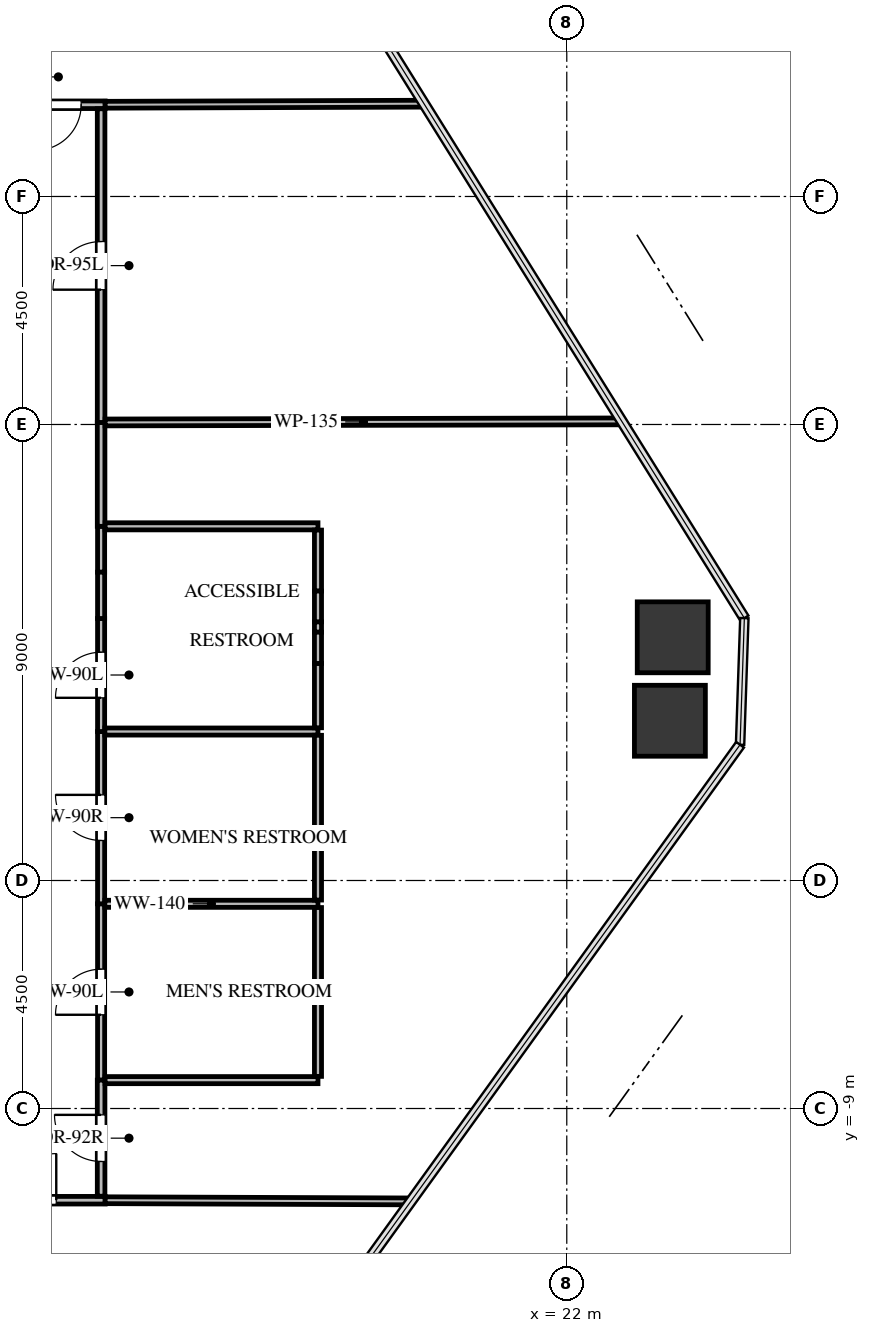
"""IFC4 building model, lengths in metres.
Left out: names, types, materials, properties, quantities, classifications, styles, units other than length and angle.
Written with IfcOpenShell. Run it as: python <this file> out.ifc"""

import sys

from ifc_helpers import new_model, si_unit, direction, frame, frame_2d, origin, origin_2d, place, context, subcontext, project, spatial, rectangle, extrude, source, transform, mapped, element, fill, save


model = new_model("IFC4")
c1 = context("Model", 3, precision=1e-05, world=origin(), true_north=direction((0.0, 1.0)))
c2 = subcontext(c1, "Body", "Model", "MODEL_VIEW")
j1 = project(units=[si_unit("LENGTHUNIT", "METRE"), si_unit("PLANEANGLEUNIT", "RADIAN")], contexts=[c1])
p1 = place(None, origin())
s1 = spatial("IfcSite", under=j1, at=p1, CompositionType="ELEMENT")
p2 = place(p1, origin())
s2 = spatial("IfcBuilding", under=s1, at=p2, CompositionType="ELEMENT")
p3 = place(p2, frame((0.0, 0.0, 45.6)))
s3 = spatial("IfcBuildingStorey", under=s2, at=p3, CompositionType="ELEMENT", Elevation=45.6)
m1 = source(origin(), c2, "Body", "SweptSolid", [
    extrude(rectangle(XDim=1.4, YDim=1.4, at=origin_2d()), origin(), (0.0, 0.0, 1.0), 3.3),
])
for number, where, z_axis, x_axis in (
    (1, (24.091, 0.3, -0.24), (0.0, 0.0, 1.0), (1.0, 0.0, 0.0)),
    (2, (24.035, -1.347, -0.24), (0.0, 0.0, 1.0), (1.0, 0.0, 0.0)),
):
    element("IfcColumn", number, at=place(p3, frame(where, z_axis=z_axis, x_axis=x_axis)), inside=s3, PredefinedType="COLUMN", context=c2, shape_type="MappedRepresentation", body=[
        mapped(m1, transform((0.0, 0.0, 0.0), x_axis=(1.0, 0.0, 0.0), y_axis=(0.0, 1.0, 0.0), z_axis=(0.0, 0.0, 1.0), scale=1.0)),
    ])
p4 = place(p3, frame((12.81, -8.44, 0.0), z_axis=(0.0, 0.0, 1.0), x_axis=(0.0, 1.0, 0.0)))
e3 = element("IfcWall", 3, at=p4, inside=s3, PredefinedType="PARTITIONING", context=c2, shape_type="SweptSolid", body=[
    extrude(rectangle(XDim=3.48, YDim=0.14, at=frame_2d((1.74, 0.0))), origin(), (0.0, 0.0, 1.0), 3.045),
])
p5 = place(p4, frame((1.29, 0.0, 0.0)))
e4 = element("IfcOpeningElement", 4, at=p5, cuts=e3, PredefinedType="OPENING", context=c2, shape_type="SweptSolid", body=[
    extrude(rectangle(XDim=0.9, YDim=2.05, at=frame_2d((0.45, 1.025))), frame((0.0, 0.08, 0.0), z_axis=(0.0, -1.0, 0.0), x_axis=(1.0, 0.0, 0.0)), (0.0, 0.0, 1.0), 0.16),
])
p6 = place(p3, frame((12.81, -4.96, 0.0), z_axis=(0.0, 0.0, 1.0), x_axis=(0.0, 1.0, 0.0)))
e5 = element("IfcWall", 5, at=p6, inside=s3, PredefinedType="PARTITIONING", context=c2, shape_type="SweptSolid", body=[
    extrude(rectangle(XDim=3.4, YDim=0.14, at=frame_2d((1.7, 0.0))), origin(), (0.0, 0.0, 1.0), 3.045),
])
p7 = place(p6, frame((1.25, 0.0, 0.0)))
e6 = element("IfcOpeningElement", 6, at=p7, cuts=e5, PredefinedType="OPENING", context=c2, shape_type="SweptSolid", body=[
    extrude(rectangle(XDim=0.9, YDim=2.05, at=frame_2d((0.45, 1.025))), frame((0.0, 0.08, 0.0), z_axis=(0.0, -1.0, 0.0), x_axis=(1.0, 0.0, 0.0)), (0.0, 0.0, 1.0), 0.16),
])
p8 = place(p3, frame((12.81, -1.56, 0.0), z_axis=(0.0, 0.0, 1.0), x_axis=(0.0, 1.0, 0.0)))
e7 = element("IfcWall", 7, at=p8, inside=s3, PredefinedType="PARTITIONING", context=c2, shape_type="SweptSolid", body=[
    extrude(rectangle(XDim=2.231, YDim=0.14, at=frame_2d((1.116, 0.0))), origin(), (0.0, 0.0, 1.0), 3.045),
])
p9 = place(p8, frame((0.666, 0.0, 0.0)))
e8 = element("IfcOpeningElement", 8, at=p9, cuts=e7, PredefinedType="OPENING", context=c2, shape_type="SweptSolid", body=[
    extrude(rectangle(XDim=0.9, YDim=2.05, at=frame_2d((0.45, 1.025))), frame((0.0, 0.08, 0.0), z_axis=(0.0, -1.0, 0.0), x_axis=(1.0, 0.0, 0.0)), (0.0, 0.0, 1.0), 0.16),
])
p10 = place(p3, frame((12.81, 1.585, 0.0), z_axis=(0.0, 0.0, 1.0), x_axis=(0.0, 1.0, 0.0)))
e9 = element("IfcWall", 9, at=p10, inside=s3, PredefinedType="PARTITIONING", context=c2, shape_type="SweptSolid", body=[
    extrude(rectangle(XDim=0.905, YDim=0.14, at=frame_2d((0.453, 0.0))), origin(), (0.0, 0.0, 1.0), 3.045),
])
p11 = place(p3, frame((12.81, 0.671, 0.0), z_axis=(0.0, 0.0, 1.0), x_axis=(0.0, 1.0, 0.0)))
e10 = element("IfcWall", 10, at=p11, inside=s3, PredefinedType="PARTITIONING", context=c2, shape_type="SweptSolid", body=[
    extrude(rectangle(XDim=0.914, YDim=0.14, at=frame_2d((0.457, 0.0))), origin(), (0.0, 0.0, 1.0), 2.13),
])
p12 = place(p3, frame((12.89, 10.81, 0.0), z_axis=(0.0, 0.0, 1.0), x_axis=(-1.0, 0.0, 0.0)))
e11 = element("IfcWall", 11, at=p12, inside=s3, PredefinedType="PARTITIONING", context=c2, shape_type="SweptSolid", body=[
    extrude(rectangle(XDim=1.847, YDim=0.15, at=frame_2d((0.924, 0.0))), origin(), (0.0, 0.0, 1.0), 3.045),
])
p13 = place(p12, frame((0.474, 0.0, 0.0)))
e12 = element("IfcOpeningElement", 12, at=p13, cuts=e11, PredefinedType="OPENING", context=c2, shape_type="SweptSolid", body=[
    extrude(rectangle(XDim=0.9, YDim=2.05, at=frame_2d((0.45, 1.025))), frame((0.0, 0.085, 0.0), z_axis=(0.0, -1.0, 0.0), x_axis=(1.0, 0.0, 0.0)), (0.0, 0.0, 1.0), 0.17),
])
p14 = place(p3, frame((10.04, -10.81, 0.0), z_axis=(0.0, 0.0, 1.0), x_axis=(1.0, 0.0, 0.0)))
e13 = element("IfcWall", 13, at=p14, inside=s3, PredefinedType="PARTITIONING", context=c2, shape_type="SweptSolid", body=[
    extrude(rectangle(XDim=2.85, YDim=0.15, at=frame_2d((1.425, 0.0))), origin(), (0.0, 0.0, 1.0), 3.045),
])
p15 = place(p14, frame((0.965, 0.0, 0.0)))
e14 = element("IfcOpeningElement", 14, at=p15, cuts=e13, PredefinedType="OPENING", context=c2, shape_type="SweptSolid", body=[
    extrude(rectangle(XDim=0.92, YDim=2.1, at=frame_2d((0.46, 1.05))), frame((0.0, 0.085, 0.0), z_axis=(0.0, -1.0, 0.0), x_axis=(1.0, 0.0, 0.0)), (0.0, 0.0, 1.0), 0.17),
])
p16 = place(p3, frame((12.81, -10.731, 0.0), z_axis=(0.0, 0.0, 1.0), x_axis=(0.0, 1.0, 0.0)))
e15 = element("IfcWall", 15, at=p16, inside=s3, PredefinedType="PARTITIONING", context=c2, shape_type="SweptSolid", body=[
    extrude(rectangle(XDim=2.291, YDim=0.15, at=frame_2d((1.146, 0.0))), origin(), (0.0, 0.0, 1.0), 3.045),
])
p17 = place(p16, frame((0.686, 0.0, 0.0)))
e16 = element("IfcOpeningElement", 16, at=p17, cuts=e15, PredefinedType="OPENING", context=c2, shape_type="SweptSolid", body=[
    extrude(rectangle(XDim=0.92, YDim=2.1, at=frame_2d((0.46, 1.05))), frame((0.0, 0.085, 0.0), z_axis=(0.0, -1.0, 0.0), x_axis=(1.0, 0.0, 0.0)), (0.0, 0.0, 1.0), 0.17),
])
p18 = place(p3, frame((12.81, 2.49, 0.0), z_axis=(0.0, 0.0, 1.0), x_axis=(0.0, 1.0, 0.0)))
e17 = element("IfcWall", 17, at=p18, inside=s3, PredefinedType="PARTITIONING", context=c2, shape_type="SweptSolid", body=[
    extrude(rectangle(XDim=2.05, YDim=0.15, at=frame_2d((1.025, 0.0))), origin(), (0.0, 0.0, 1.0), 3.045),
])
p19 = place(p3, frame((12.81, 4.54, 0.0), z_axis=(0.0, 0.0, 1.0), x_axis=(0.0, 1.0, 0.0)))
e18 = element("IfcWall", 18, at=p19, inside=s3, PredefinedType="PARTITIONING", context=c2, shape_type="SweptSolid", body=[
    extrude(rectangle(XDim=6.191, YDim=0.15, at=frame_2d((3.095, 0.0))), origin(), (0.0, 0.0, 1.0), 3.045),
])
p20 = place(p19, frame((2.621, 0.0, 0.0)))
e19 = element("IfcOpeningElement", 19, at=p20, cuts=e18, PredefinedType="OPENING", context=c2, shape_type="SweptSolid", body=[
    extrude(rectangle(XDim=0.95, YDim=2.1, at=frame_2d((0.475, 1.05))), frame((0.0, 0.085, 0.0), z_axis=(0.0, -1.0, 0.0), x_axis=(1.0, 0.0, 0.0)), (0.0, 0.0, 1.0), 0.17),
])
p21 = place(p3, frame((12.884, -4.96, 0.0), z_axis=(0.0, 0.0, 1.0), x_axis=(1.0, 0.0, 0.0)))
e20 = element("IfcWall", 20, at=p21, inside=s3, PredefinedType="PARTITIONING", context=c2, shape_type="SweptSolid", body=[
    extrude(rectangle(XDim=4.206, YDim=0.14, at=frame_2d((2.103, 0.0))), origin(), (0.0, 0.0, 1.0), 3.045),
])
p22 = place(p3, frame((17.09, -8.44, 0.0), z_axis=(0.0, 0.0, 1.0), x_axis=(-1.0, 0.0, 0.0)))
e21 = element("IfcWall", 21, at=p22, inside=s3, PredefinedType="PARTITIONING", context=c2, shape_type="SweptSolid", body=[
    extrude(rectangle(XDim=4.201, YDim=0.14, at=frame_2d((2.101, 0.0))), origin(), (0.0, 0.0, 1.0), 3.045),
])
p23 = place(p3, frame((17.09, -5.034, 0.0), z_axis=(0.0, 0.0, 1.0), x_axis=(0.0, -1.0, 0.0)))
e22 = element("IfcWall", 22, at=p23, inside=s3, PredefinedType="PARTITIONING", context=c2, shape_type="SweptSolid", body=[
    extrude(rectangle(XDim=3.332, YDim=0.14, at=frame_2d((1.666, 0.0))), origin(), (0.0, 0.0, 1.0), 3.045),
])
p24 = place(p3, frame((12.884, -1.56, 0.0), z_axis=(0.0, 0.0, 1.0), x_axis=(1.0, 0.0, 0.0)))
e23 = element("IfcWall", 23, at=p24, inside=s3, PredefinedType="PARTITIONING", context=c2, shape_type="SweptSolid", body=[
    extrude(rectangle(XDim=4.206, YDim=0.14, at=frame_2d((2.103, 0.0))), origin(), (0.0, 0.0, 1.0), 3.045),
])
p25 = place(p3, frame((17.09, -1.634, 0.0), z_axis=(0.0, 0.0, 1.0), x_axis=(0.0, -1.0, 0.0)))
e24 = element("IfcWall", 24, at=p25, inside=s3, PredefinedType="PARTITIONING", context=c2, shape_type="SweptSolid", body=[
    extrude(rectangle(XDim=3.252, YDim=0.14, at=frame_2d((1.626, 0.0))), origin(), (0.0, 0.0, 1.0), 3.045),
])
p26 = place(p3, frame((12.889, 2.49, 0.0), z_axis=(0.0, 0.0, 1.0), x_axis=(1.0, 0.0, 0.0)))
e25 = element("IfcWall", 25, at=p26, inside=s3, PredefinedType="PARTITIONING", context=c2, shape_type="SweptSolid", body=[
    extrude(rectangle(XDim=4.201, YDim=0.14, at=frame_2d((2.101, 0.0))), origin(), (0.0, 0.0, 1.0), 3.045),
])
p27 = place(p3, frame((17.09, 2.416, 0.0), z_axis=(0.0, 0.0, 1.0), x_axis=(0.0, -1.0, 0.0)))
e26 = element("IfcWall", 26, at=p27, inside=s3, PredefinedType="PARTITIONING", context=c2, shape_type="SweptSolid", body=[
    extrude(rectangle(XDim=1.204, YDim=0.14, at=frame_2d((0.602, 0.0))), origin(), (0.0, 0.0, 1.0), 3.045),
])
p28 = place(p3, frame((17.09, 0.606, 0.0), z_axis=(0.0, 0.0, 1.0), x_axis=(0.0, -1.0, 0.0)))
e27 = element("IfcWall", 27, at=p28, inside=s3, PredefinedType="PARTITIONING", context=c2, shape_type="SweptSolid", body=[
    extrude(rectangle(XDim=0.205, YDim=0.14, at=frame_2d((0.103, 0.0))), origin(), (0.0, 0.0, 1.0), 3.045),
])
p29 = place(p3, frame((17.09, -0.216, 0.0), z_axis=(0.0, 0.0, 1.0), x_axis=(0.0, -1.0, 0.0)))
e28 = element("IfcWall", 28, at=p29, inside=s3, PredefinedType="PARTITIONING", context=c2, shape_type="SweptSolid", body=[
    extrude(rectangle(XDim=1.27, YDim=0.14, at=frame_2d((0.635, 0.0))), origin(), (0.0, 0.0, 1.0), 3.045),
])
p30 = place(p3, frame((17.09, 1.212, 0.0), z_axis=(0.0, 0.0, 1.0), x_axis=(0.0, -1.0, 0.0)))
e29 = element("IfcWall", 29, at=p30, inside=s3, PredefinedType="PARTITIONING", context=c2, shape_type="SweptSolid", body=[
    extrude(rectangle(XDim=0.606, YDim=0.14, at=frame_2d((0.303, 0.0))), origin(), (0.0, 0.0, 1.0), 2.13),
])
p31 = place(p3, frame((17.09, 0.401, 0.0), z_axis=(0.0, 0.0, 1.0), x_axis=(0.0, -1.0, 0.0)))
e30 = element("IfcWall", 30, at=p31, inside=s3, PredefinedType="PARTITIONING", context=c2, shape_type="SweptSolid", body=[
    extrude(rectangle(XDim=0.617, YDim=0.14, at=frame_2d((0.309, 0.0))), origin(), (0.0, 0.0, 1.0), 2.13),
])
p32 = place(p3, frame((19.182, 10.831, 0.0), z_axis=(0.0, 0.0, 1.0), x_axis=(-0.999994432845, -0.003336806783, 0.0)))
e31 = element("IfcWall", 31, at=p32, inside=s3, PredefinedType="PARTITIONING", context=c2, shape_type="SweptSolid", body=[
    extrude(rectangle(XDim=6.292, YDim=0.135, at=frame_2d((3.146, 0.0))), origin(), (0.0, 0.0, 1.0), 2.38),
])
p33 = place(p3, frame((12.89, -10.81, 0.0), z_axis=(0.0, 0.0, 1.0), x_axis=(0.999992607823, -0.003845035728, 0.0)))
e32 = element("IfcWall", 32, at=p33, inside=s3, PredefinedType="PARTITIONING", context=c2, shape_type="SweptSolid", body=[
    extrude(rectangle(XDim=6.032, YDim=0.135, at=frame_2d((3.016, 0.0))), origin(), (0.0, 0.0, 1.0), 2.38),
])
p34 = place(p3, frame((12.889, 4.54, 0.0), z_axis=(0.0, 0.0, 1.0), x_axis=(0.99999792939, 0.002034997821, 0.0)))
e33 = element("IfcWall", 33, at=p34, inside=s3, PredefinedType="PARTITIONING", context=c2, shape_type="SweptSolid", body=[
    extrude(rectangle(XDim=10.198, YDim=0.135, at=frame_2d((5.099, 0.0))), origin(), (0.0, 0.0, 1.0), 2.38),
])
m2 = source(origin(), c2, "Body", "SweptSolid", [
    extrude(rectangle(XDim=0.9, YDim=2.05, at=frame_2d((0.45, 1.025))), frame((0.0, 0.025, 0.0), z_axis=(0.0, -1.0, 0.0), x_axis=(1.0, 0.0, 0.0)), (0.0, 0.0, 1.0), 0.05),
])
p35 = place(p5, origin())
e34 = element("IfcDoor", 34, at=p35, inside=s3, OperationType="SINGLE_SWING_LEFT", PredefinedType="DOOR", context=c2, shape_type="MappedRepresentation", body=[
    mapped(m2, transform((0.0, 0.0, 0.0), x_axis=(1.0, 0.0, 0.0), y_axis=(0.0, 1.0, 0.0), z_axis=(0.0, 0.0, 1.0), scale=1.0)),
])
fill(e4, e34)
m3 = source(origin(), c2, "Body", "SweptSolid", [
    extrude(rectangle(XDim=0.9, YDim=2.05, at=frame_2d((0.45, 1.025))), frame((0.0, 0.025, 0.0), z_axis=(0.0, -1.0, 0.0), x_axis=(1.0, 0.0, 0.0)), (0.0, 0.0, 1.0), 0.05),
])
p36 = place(p7, origin())
e35 = element("IfcDoor", 35, at=p36, inside=s3, OperationType="SINGLE_SWING_RIGHT", PredefinedType="DOOR", context=c2, shape_type="MappedRepresentation", body=[
    mapped(m3, transform((0.0, 0.0, 0.0), x_axis=(1.0, 0.0, 0.0), y_axis=(0.0, 1.0, 0.0), z_axis=(0.0, 0.0, 1.0), scale=1.0)),
])
fill(e6, e35)
p37 = place(p9, origin())
e36 = element("IfcDoor", 36, at=p37, inside=s3, OperationType="SINGLE_SWING_LEFT", PredefinedType="DOOR", context=c2, shape_type="MappedRepresentation", body=[
    mapped(m2, transform((0.0, 0.0, 0.0), x_axis=(1.0, 0.0, 0.0), y_axis=(0.0, 1.0, 0.0), z_axis=(0.0, 0.0, 1.0), scale=1.0)),
])
fill(e8, e36)
p38 = place(p13, origin())
e37 = element("IfcDoor", 37, at=p38, inside=s3, OperationType="SINGLE_SWING_RIGHT", PredefinedType="DOOR", context=c2, shape_type="MappedRepresentation", body=[
    mapped(m3, transform((0.0, 0.0, 0.0), x_axis=(1.0, 0.0, 0.0), y_axis=(0.0, 1.0, 0.0), z_axis=(0.0, 0.0, 1.0), scale=1.0)),
])
fill(e12, e37)
m4 = source(origin(), c2, "Body", "SweptSolid", [
    extrude(rectangle(XDim=0.92, YDim=2.1, at=frame_2d((0.46, 1.05))), frame((0.0, 0.025, 0.0), z_axis=(0.0, -1.0, 0.0), x_axis=(1.0, 0.0, 0.0)), (0.0, 0.0, 1.0), 0.05),
])
p39 = place(p15, origin())
e38 = element("IfcDoor", 38, at=p39, inside=s3, OperationType="SINGLE_SWING_RIGHT", PredefinedType="DOOR", context=c2, shape_type="MappedRepresentation", body=[
    mapped(m4, transform((0.0, 0.0, 0.0), x_axis=(1.0, 0.0, 0.0), y_axis=(0.0, 1.0, 0.0), z_axis=(0.0, 0.0, 1.0), scale=1.0)),
])
fill(e14, e38)
p40 = place(p17, origin())
e39 = element("IfcDoor", 39, at=p40, inside=s3, OperationType="SINGLE_SWING_RIGHT", PredefinedType="DOOR", context=c2, shape_type="MappedRepresentation", body=[
    mapped(m4, transform((0.0, 0.0, 0.0), x_axis=(1.0, 0.0, 0.0), y_axis=(0.0, 1.0, 0.0), z_axis=(0.0, 0.0, 1.0), scale=1.0)),
])
fill(e16, e39)
m5 = source(origin(), c2, "Body", "SweptSolid", [
    extrude(rectangle(XDim=0.95, YDim=2.1, at=frame_2d((0.475, 1.05))), frame((0.0, 0.025, 0.0), z_axis=(0.0, -1.0, 0.0), x_axis=(1.0, 0.0, 0.0)), (0.0, 0.0, 1.0), 0.05),
])
p41 = place(p20, origin())
e40 = element("IfcDoor", 40, at=p41, inside=s3, OperationType="SINGLE_SWING_LEFT", PredefinedType="DOOR", context=c2, shape_type="MappedRepresentation", body=[
    mapped(m5, transform((0.0, 0.0, 0.0), x_axis=(1.0, 0.0, 0.0), y_axis=(0.0, 1.0, 0.0), z_axis=(0.0, 0.0, 1.0), scale=1.0)),
])
fill(e19, e40)
save(model, sys.argv[1])
